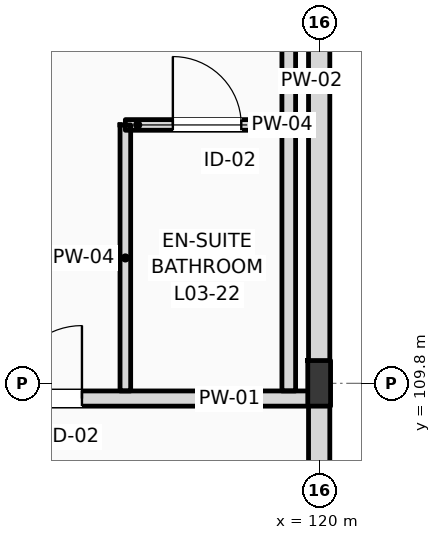
"""IFC4 building model, lengths in metres.
Left out: names, types, materials, properties, quantities, classifications, styles, units other than length and angle.
Written with IfcOpenShell. Run it as: python <this file> out.ifc"""

import sys

from ifc_helpers import new_model, si_unit, direction, frame, frame_2d, origin, origin_2d, place, context, subcontext, project, spatial, rectangle, i_section, extrude, element, fill, save


model = new_model("IFC4")
c1 = context("Model", 3, precision=1e-05, world=origin(), true_north=direction((0.0, 1.0)))
c2 = subcontext(c1, "Body", "Model", "MODEL_VIEW")
j1 = project(units=[si_unit("LENGTHUNIT", "METRE"), si_unit("PLANEANGLEUNIT", "RADIAN")], contexts=[c1])
p1 = place(None, origin())
s1 = spatial("IfcSite", under=j1, at=p1, CompositionType="ELEMENT")
p2 = place(p1, origin())
s2 = spatial("IfcBuilding", under=s1, at=p2, CompositionType="ELEMENT")
p3 = place(p2, frame((0.0, 0.0, 16.2)))
s3 = spatial("IfcBuildingStorey", under=s2, at=p3, CompositionType="ELEMENT", Elevation=16.2)
p4 = place(p3, frame((120.0, 109.8, 0.0), z_axis=(0.0, 0.0, 1.0), x_axis=(1.0, 0.0, 0.0)))
e1 = element("IfcColumn", 1, at=p4, inside=s3, PredefinedType="COLUMN", context=c2, shape_type="SweptSolid", body=[
    extrude(i_section(OverallWidth=0.3, OverallDepth=0.6, WebThickness=0.015, FlangeThickness=0.03, FilletRadius=0.027, at=origin_2d()), origin(), (0.0, 0.0, 1.0), 4.2),
])
p5 = place(p3, frame((120.0, 96.0, 0.0), z_axis=(0.0, 0.0, 1.0), x_axis=(0.0, 1.0, 0.0)))
e2 = element("IfcWall", 2, at=p5, inside=s3, PredefinedType="STANDARD", context=c2, shape_type="SweptSolid", body=[
    extrude(rectangle(XDim=22.0, YDim=0.28, at=frame_2d((11.0, 0.0))), origin(), (0.0, 0.0, 1.0), 3.51),
])
p6 = place(p3, frame((10.65, 109.6, 0.0), z_axis=(0.0, 0.0, 1.0), x_axis=(1.0, 0.0, 0.0)))
e3 = element("IfcWall", 3, at=p6, inside=s3, PredefinedType="PARTITIONING", context=c2, shape_type="SweptSolid", body=[
    extrude(rectangle(XDim=109.21, YDim=0.2, at=frame_2d((54.605, 0.0))), origin(), (0.0, 0.0, 1.0), 3.36),
])
p7 = place(p6, frame((15.43, 0.0, 0.0)))
e4 = element("IfcOpeningElement", 4, at=p7, cuts=e3, PredefinedType="OPENING", context=c2, shape_type="SweptSolid", body=[
    extrude(rectangle(XDim=1.02, YDim=2.2, at=frame_2d((0.51, 1.1))), frame((0.0, 0.11, 0.0), z_axis=(0.0, -1.0, 0.0), x_axis=(1.0, 0.0, 0.0)), (0.0, 0.0, 1.0), 0.22),
])
p8 = place(p6, frame((19.537, 0.0, 0.0)))
e5 = element("IfcOpeningElement", 5, at=p8, cuts=e3, PredefinedType="OPENING", context=c2, shape_type="SweptSolid", body=[
    extrude(rectangle(XDim=1.02, YDim=2.2, at=frame_2d((0.51, 1.1))), frame((0.0, 0.11, 0.0), z_axis=(0.0, -1.0, 0.0), x_axis=(1.0, 0.0, 0.0)), (0.0, 0.0, 1.0), 0.22),
])
p9 = place(p6, frame((23.928, 0.0, 0.0)))
e6 = element("IfcOpeningElement", 6, at=p9, cuts=e3, PredefinedType="OPENING", context=c2, shape_type="SweptSolid", body=[
    extrude(rectangle(XDim=1.02, YDim=2.2, at=frame_2d((0.51, 1.1))), frame((0.0, 0.11, 0.0), z_axis=(0.0, -1.0, 0.0), x_axis=(1.0, 0.0, 0.0)), (0.0, 0.0, 1.0), 0.22),
])
p10 = place(p6, frame((26.169, 0.0, 0.0)))
e7 = element("IfcOpeningElement", 7, at=p10, cuts=e3, PredefinedType="OPENING", context=c2, shape_type="SweptSolid", body=[
    extrude(rectangle(XDim=1.02, YDim=2.2, at=frame_2d((0.51, 1.1))), frame((0.0, 0.11, 0.0), z_axis=(0.0, -1.0, 0.0), x_axis=(1.0, 0.0, 0.0)), (0.0, 0.0, 1.0), 0.22),
])
p11 = place(p6, frame((32.739, 0.0, 0.0)))
e8 = element("IfcOpeningElement", 8, at=p11, cuts=e3, PredefinedType="OPENING", context=c2, shape_type="SweptSolid", body=[
    extrude(rectangle(XDim=0.96, YDim=2.2, at=frame_2d((0.48, 1.1))), frame((0.0, 0.11, 0.0), z_axis=(0.0, -1.0, 0.0), x_axis=(1.0, 0.0, 0.0)), (0.0, 0.0, 1.0), 0.22),
])
p12 = place(p6, frame((34.98, 0.0, 0.0)))
e9 = element("IfcOpeningElement", 9, at=p12, cuts=e3, PredefinedType="OPENING", context=c2, shape_type="SweptSolid", body=[
    extrude(rectangle(XDim=0.96, YDim=2.2, at=frame_2d((0.48, 1.1))), frame((0.0, 0.11, 0.0), z_axis=(0.0, -1.0, 0.0), x_axis=(1.0, 0.0, 0.0)), (0.0, 0.0, 1.0), 0.22),
])
p13 = place(p6, frame((41.521, 0.0, 0.0)))
e10 = element("IfcOpeningElement", 10, at=p13, cuts=e3, PredefinedType="OPENING", context=c2, shape_type="SweptSolid", body=[
    extrude(rectangle(XDim=0.96, YDim=2.2, at=frame_2d((0.48, 1.1))), frame((0.0, 0.11, 0.0), z_axis=(0.0, -1.0, 0.0), x_axis=(1.0, 0.0, 0.0)), (0.0, 0.0, 1.0), 0.22),
])
p14 = place(p6, frame((43.512, 0.0, 0.0)))
e11 = element("IfcOpeningElement", 11, at=p14, cuts=e3, PredefinedType="OPENING", context=c2, shape_type="SweptSolid", body=[
    extrude(rectangle(XDim=0.96, YDim=2.2, at=frame_2d((0.48, 1.1))), frame((0.0, 0.11, 0.0), z_axis=(0.0, -1.0, 0.0), x_axis=(1.0, 0.0, 0.0)), (0.0, 0.0, 1.0), 0.22),
])
p15 = place(p6, frame((50.303, 0.0, 0.0)))
e12 = element("IfcOpeningElement", 12, at=p15, cuts=e3, PredefinedType="OPENING", context=c2, shape_type="SweptSolid", body=[
    extrude(rectangle(XDim=0.96, YDim=2.2, at=frame_2d((0.48, 1.1))), frame((0.0, 0.11, 0.0), z_axis=(0.0, -1.0, 0.0), x_axis=(1.0, 0.0, 0.0)), (0.0, 0.0, 1.0), 0.22),
])
p16 = place(p6, frame((54.944, 0.0, 0.0)))
e13 = element("IfcOpeningElement", 13, at=p16, cuts=e3, PredefinedType="OPENING", context=c2, shape_type="SweptSolid", body=[
    extrude(rectangle(XDim=0.96, YDim=2.2, at=frame_2d((0.48, 1.1))), frame((0.0, 0.11, 0.0), z_axis=(0.0, -1.0, 0.0), x_axis=(1.0, 0.0, 0.0)), (0.0, 0.0, 1.0), 0.22),
])
p17 = place(p6, frame((59.085, 0.0, 0.0)))
e14 = element("IfcOpeningElement", 14, at=p17, cuts=e3, PredefinedType="OPENING", context=c2, shape_type="SweptSolid", body=[
    extrude(rectangle(XDim=0.96, YDim=2.2, at=frame_2d((0.48, 1.1))), frame((0.0, 0.11, 0.0), z_axis=(0.0, -1.0, 0.0), x_axis=(1.0, 0.0, 0.0)), (0.0, 0.0, 1.0), 0.22),
])
p18 = place(p6, frame((63.476, 0.0, 0.0)))
e15 = element("IfcOpeningElement", 15, at=p18, cuts=e3, PredefinedType="OPENING", context=c2, shape_type="SweptSolid", body=[
    extrude(rectangle(XDim=0.96, YDim=2.2, at=frame_2d((0.48, 1.1))), frame((0.0, 0.11, 0.0), z_axis=(0.0, -1.0, 0.0), x_axis=(1.0, 0.0, 0.0)), (0.0, 0.0, 1.0), 0.22),
])
p19 = place(p6, frame((65.716, 0.0, 0.0)))
e16 = element("IfcOpeningElement", 16, at=p19, cuts=e3, PredefinedType="OPENING", context=c2, shape_type="SweptSolid", body=[
    extrude(rectangle(XDim=0.96, YDim=2.2, at=frame_2d((0.48, 1.1))), frame((0.0, 0.11, 0.0), z_axis=(0.0, -1.0, 0.0), x_axis=(1.0, 0.0, 0.0)), (0.0, 0.0, 1.0), 0.22),
])
p20 = place(p6, frame((72.257, 0.0, 0.0)))
e17 = element("IfcOpeningElement", 17, at=p20, cuts=e3, PredefinedType="OPENING", context=c2, shape_type="SweptSolid", body=[
    extrude(rectangle(XDim=0.96, YDim=2.2, at=frame_2d((0.48, 1.1))), frame((0.0, 0.11, 0.0), z_axis=(0.0, -1.0, 0.0), x_axis=(1.0, 0.0, 0.0)), (0.0, 0.0, 1.0), 0.22),
])
p21 = place(p6, frame((74.498, 0.0, 0.0)))
e18 = element("IfcOpeningElement", 18, at=p21, cuts=e3, PredefinedType="OPENING", context=c2, shape_type="SweptSolid", body=[
    extrude(rectangle(XDim=0.96, YDim=2.2, at=frame_2d((0.48, 1.1))), frame((0.0, 0.11, 0.0), z_axis=(0.0, -1.0, 0.0), x_axis=(1.0, 0.0, 0.0)), (0.0, 0.0, 1.0), 0.22),
])
p22 = place(p6, frame((81.039, 0.0, 0.0)))
e19 = element("IfcOpeningElement", 19, at=p22, cuts=e3, PredefinedType="OPENING", context=c2, shape_type="SweptSolid", body=[
    extrude(rectangle(XDim=0.96, YDim=2.2, at=frame_2d((0.48, 1.1))), frame((0.0, 0.11, 0.0), z_axis=(0.0, -1.0, 0.0), x_axis=(1.0, 0.0, 0.0)), (0.0, 0.0, 1.0), 0.22),
])
p23 = place(p6, frame((85.68, 0.0, 0.0)))
e20 = element("IfcOpeningElement", 20, at=p23, cuts=e3, PredefinedType="OPENING", context=c2, shape_type="SweptSolid", body=[
    extrude(rectangle(XDim=0.96, YDim=2.2, at=frame_2d((0.48, 1.1))), frame((0.0, 0.11, 0.0), z_axis=(0.0, -1.0, 0.0), x_axis=(1.0, 0.0, 0.0)), (0.0, 0.0, 1.0), 0.22),
])
p24 = place(p6, frame((89.82, 0.0, 0.0)))
e21 = element("IfcOpeningElement", 21, at=p24, cuts=e3, PredefinedType="OPENING", context=c2, shape_type="SweptSolid", body=[
    extrude(rectangle(XDim=0.96, YDim=2.2, at=frame_2d((0.48, 1.1))), frame((0.0, 0.11, 0.0), z_axis=(0.0, -1.0, 0.0), x_axis=(1.0, 0.0, 0.0)), (0.0, 0.0, 1.0), 0.22),
])
p25 = place(p6, frame((94.211, 0.0, 0.0)))
e22 = element("IfcOpeningElement", 22, at=p25, cuts=e3, PredefinedType="OPENING", context=c2, shape_type="SweptSolid", body=[
    extrude(rectangle(XDim=0.96, YDim=2.2, at=frame_2d((0.48, 1.1))), frame((0.0, 0.11, 0.0), z_axis=(0.0, -1.0, 0.0), x_axis=(1.0, 0.0, 0.0)), (0.0, 0.0, 1.0), 0.22),
])
p26 = place(p6, frame((98.602, 0.0, 0.0)))
e23 = element("IfcOpeningElement", 23, at=p26, cuts=e3, PredefinedType="OPENING", context=c2, shape_type="SweptSolid", body=[
    extrude(rectangle(XDim=0.96, YDim=2.2, at=frame_2d((0.48, 1.1))), frame((0.0, 0.11, 0.0), z_axis=(0.0, -1.0, 0.0), x_axis=(1.0, 0.0, 0.0)), (0.0, 0.0, 1.0), 0.22),
])
p27 = place(p6, frame((102.993, 0.0, 0.0)))
e24 = element("IfcOpeningElement", 24, at=p27, cuts=e3, PredefinedType="OPENING", context=c2, shape_type="SweptSolid", body=[
    extrude(rectangle(XDim=0.96, YDim=2.2, at=frame_2d((0.48, 1.1))), frame((0.0, 0.11, 0.0), z_axis=(0.0, -1.0, 0.0), x_axis=(1.0, 0.0, 0.0)), (0.0, 0.0, 1.0), 0.22),
])
p28 = place(p6, frame((105.269, 0.0, 0.0)))
e25 = element("IfcOpeningElement", 25, at=p28, cuts=e3, PredefinedType="OPENING", context=c2, shape_type="SweptSolid", body=[
    extrude(rectangle(XDim=0.96, YDim=2.2, at=frame_2d((0.48, 1.1))), frame((0.0, 0.11, 0.0), z_axis=(0.0, -1.0, 0.0), x_axis=(1.0, 0.0, 0.0)), (0.0, 0.0, 1.0), 0.22),
])
p29 = place(p6, frame((2.716, 0.0, 0.0)))
e26 = element("IfcOpeningElement", 26, at=p29, cuts=e3, PredefinedType="OPENING", context=c2, shape_type="SweptSolid", body=[
    extrude(rectangle(XDim=1.35, YDim=2.25, at=frame_2d((0.675, 1.125))), frame((0.0, 0.11, 0.0), z_axis=(0.0, -1.0, 0.0), x_axis=(1.0, 0.0, 0.0)), (0.0, 0.0, 1.0), 0.22),
])
p30 = place(p6, frame((6.65, 0.0, 0.0)))
e27 = element("IfcOpeningElement", 27, at=p30, cuts=e3, PredefinedType="OPENING", context=c2, shape_type="SweptSolid", body=[
    extrude(rectangle(XDim=1.35, YDim=2.25, at=frame_2d((0.675, 1.125))), frame((0.0, 0.11, 0.0), z_axis=(0.0, -1.0, 0.0), x_axis=(1.0, 0.0, 0.0)), (0.0, 0.0, 1.0), 0.22),
])
p31 = place(p6, frame((10.583, 0.0, 0.0)))
e28 = element("IfcOpeningElement", 28, at=p31, cuts=e3, PredefinedType="OPENING", context=c2, shape_type="SweptSolid", body=[
    extrude(rectangle(XDim=1.35, YDim=2.25, at=frame_2d((0.675, 1.125))), frame((0.0, 0.11, 0.0), z_axis=(0.0, -1.0, 0.0), x_axis=(1.0, 0.0, 0.0)), (0.0, 0.0, 1.0), 0.22),
])
p32 = place(p3, frame((119.6, 109.7, 0.0), z_axis=(0.0, 0.0, 1.0), x_axis=(0.0, 1.0, 0.0)))
e29 = element("IfcWall", 29, at=p32, inside=s3, PredefinedType="PARTITIONING", context=c2, shape_type="SweptSolid", body=[
    extrude(rectangle(XDim=8.15, YDim=0.18, at=frame_2d((4.075, 0.0))), origin(), (0.0, 0.0, 1.0), 3.92),
])
p33 = place(p3, frame((117.45, 109.7, 0.0), z_axis=(0.0, 0.0, 1.0), x_axis=(0.0, 1.0, 0.0)))
e30 = element("IfcWall", 30, at=p33, inside=s3, PredefinedType="PARTITIONING", context=c2, shape_type="SweptSolid", body=[
    extrude(rectangle(XDim=3.5, YDim=0.14, at=frame_2d((1.75, 0.0))), origin(), (0.0, 0.0, 1.0), 3.92),
])
p34 = place(p3, frame((117.45, 113.2, 0.0), z_axis=(0.0, 0.0, 1.0), x_axis=(1.0, 0.0, 0.0)))
e31 = element("IfcWall", 31, at=p34, inside=s3, PredefinedType="PARTITIONING", context=c2, shape_type="SweptSolid", body=[
    extrude(rectangle(XDim=2.15, YDim=0.14, at=frame_2d((1.075, 0.0))), origin(), (0.0, 0.0, 1.0), 3.92),
])
p35 = place(p34, frame((0.625, 0.0, 0.0)))
e32 = element("IfcOpeningElement", 32, at=p35, cuts=e31, PredefinedType="OPENING", context=c2, shape_type="SweptSolid", body=[
    extrude(rectangle(XDim=0.9, YDim=2.1, at=frame_2d((0.45, 1.05))), frame((0.0, 0.08, 0.0), z_axis=(0.0, -1.0, 0.0), x_axis=(1.0, 0.0, 0.0)), (0.0, 0.0, 1.0), 0.16),
])
p36 = place(p28, origin())
e33 = element("IfcDoor", 33, at=p36, inside=s3, OperationType="SINGLE_SWING_RIGHT", PredefinedType="DOOR", context=c2, shape_type="SweptSolid", body=[
    extrude(rectangle(XDim=0.96, YDim=2.2, at=frame_2d((0.48, 1.1))), frame((0.0, 0.025, 0.0), z_axis=(0.0, -1.0, 0.0), x_axis=(1.0, 0.0, 0.0)), (0.0, 0.0, 1.0), 0.05),
])
fill(e25, e33)
p37 = place(p35, origin())
e34 = element("IfcDoor", 34, at=p37, inside=s3, OperationType="SINGLE_SWING_LEFT", PredefinedType="DOOR", context=c2, shape_type="SweptSolid", body=[
    extrude(rectangle(XDim=0.9, YDim=2.1, at=frame_2d((0.45, 1.05))), frame((0.0, 0.025, 0.0), z_axis=(0.0, -1.0, 0.0), x_axis=(1.0, 0.0, 0.0)), (0.0, 0.0, 1.0), 0.05),
])
fill(e32, e34)
save(model, sys.argv[1])
